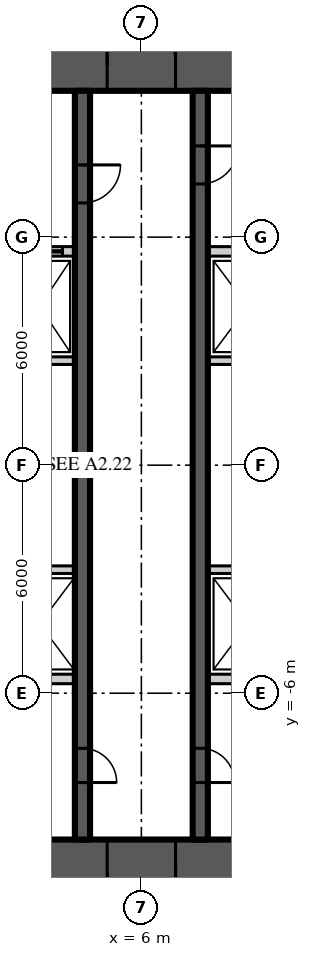
"""IFC4 building model, lengths in metres.
Left out: names, types, materials, properties, quantities, classifications, styles, units other than length and angle.
Written with IfcOpenShell. Run it as: python <this file> out.ifc"""

import sys

from ifc_helpers import new_model, si_unit, direction, frame, frame_2d, origin, place, context, subcontext, project, spatial, rectangle, extrude, element, fill, save


model = new_model("IFC4")
c1 = context("Model", 3, precision=1e-05, world=origin(), true_north=direction((0.0, 1.0)))
c2 = subcontext(c1, "Body", "Model", "MODEL_VIEW")
j1 = project(units=[si_unit("LENGTHUNIT", "METRE"), si_unit("PLANEANGLEUNIT", "RADIAN")], contexts=[c1])
p1 = place(None, origin())
s1 = spatial("IfcSite", under=j1, at=p1, CompositionType="ELEMENT")
p2 = place(p1, origin())
s2 = spatial("IfcBuilding", under=s1, at=p2, CompositionType="ELEMENT")
p3 = place(p2, frame((0.0, 0.0, 167.1)))
s3 = spatial("IfcBuildingStorey", under=s2, at=p3, CompositionType="ELEMENT", Elevation=167.1)
p4 = place(p3, frame((-11.15, 10.5, 0.0), z_axis=(0.0, 0.0, 1.0), x_axis=(1.0, 0.0, 0.0)))
e1 = element("IfcWall", 1, at=p4, inside=s3, PredefinedType="SHEAR", context=c2, shape_type="SweptSolid", body=[
    extrude(rectangle(XDim=22.3, YDim=1.3, at=frame_2d((11.15, 0.0))), origin(), (0.0, 0.0, 1.0), 3.9),
])
p5 = place(p4, frame((4.25, 0.0, 0.0)))
e2 = element("IfcOpeningElement", 2, at=p5, cuts=e1, PredefinedType="OPENING", context=c2, shape_type="SweptSolid", body=[
    extrude(rectangle(XDim=1.8, YDim=2.2, at=frame_2d((0.9, 1.1))), frame((0.0, 0.66, 0.0), z_axis=(0.0, -1.0, 0.0), x_axis=(1.0, 0.0, 0.0)), (0.0, 0.0, 1.0), 1.32),
])
p6 = place(p4, frame((16.25, 0.0, 0.0)))
e3 = element("IfcOpeningElement", 3, at=p6, cuts=e1, PredefinedType="OPENING", context=c2, shape_type="SweptSolid", body=[
    extrude(rectangle(XDim=1.8, YDim=2.2, at=frame_2d((0.9, 1.1))), frame((0.0, 0.66, 0.0), z_axis=(0.0, -1.0, 0.0), x_axis=(1.0, 0.0, 0.0)), (0.0, 0.0, 1.0), 1.32),
])
p7 = place(p3, frame((11.15, -10.5, 0.0), z_axis=(0.0, 0.0, 1.0), x_axis=(-1.0, 0.0, 0.0)))
e4 = element("IfcWall", 4, at=p7, inside=s3, PredefinedType="SHEAR", context=c2, shape_type="SweptSolid", body=[
    extrude(rectangle(XDim=22.3, YDim=1.3, at=frame_2d((11.15, 0.0))), origin(), (0.0, 0.0, 1.0), 3.9),
])
p8 = place(p7, frame((16.25, 0.0, 0.0)))
e5 = element("IfcOpeningElement", 5, at=p8, cuts=e4, PredefinedType="OPENING", context=c2, shape_type="SweptSolid", body=[
    extrude(rectangle(XDim=1.8, YDim=2.2, at=frame_2d((0.9, 1.1))), frame((0.0, 0.66, 0.0), z_axis=(0.0, -1.0, 0.0), x_axis=(1.0, 0.0, 0.0)), (0.0, 0.0, 1.0), 1.32),
])
p9 = place(p7, frame((4.25, 0.0, 0.0)))
e6 = element("IfcOpeningElement", 6, at=p9, cuts=e4, PredefinedType="OPENING", context=c2, shape_type="SweptSolid", body=[
    extrude(rectangle(XDim=1.8, YDim=2.2, at=frame_2d((0.9, 1.1))), frame((0.0, 0.66, 0.0), z_axis=(0.0, -1.0, 0.0), x_axis=(1.0, 0.0, 0.0)), (0.0, 0.0, 1.0), 1.32),
])
p10 = place(p3, frame((7.55, 9.85, 0.0), z_axis=(0.0, 0.0, 1.0), x_axis=(0.0, -1.0, 0.0)))
e7 = element("IfcWall", 7, at=p10, inside=s3, PredefinedType="SHEAR", context=c2, shape_type="SweptSolid", body=[
    extrude(rectangle(XDim=19.7, YDim=0.4, at=frame_2d((9.85, 0.0))), origin(), (0.0, 0.0, 1.0), 3.9),
])
p11 = place(p10, frame((1.45, 0.0, 0.0)))
e8 = element("IfcOpeningElement", 8, at=p11, cuts=e7, PredefinedType="OPENING", context=c2, shape_type="SweptSolid", body=[
    extrude(rectangle(XDim=1.0, YDim=2.2, at=frame_2d((0.5, 1.1))), frame((0.0, 0.21, 0.0), z_axis=(0.0, -1.0, 0.0), x_axis=(1.0, 0.0, 0.0)), (0.0, 0.0, 1.0), 0.42),
])
p12 = place(p10, frame((17.3, 0.0, 0.0)))
e9 = element("IfcOpeningElement", 9, at=p12, cuts=e7, PredefinedType="OPENING", context=c2, shape_type="SweptSolid", body=[
    extrude(rectangle(XDim=0.9, YDim=2.1, at=frame_2d((0.45, 1.05))), frame((0.0, 0.21, 0.0), z_axis=(0.0, -1.0, 0.0), x_axis=(1.0, 0.0, 0.0)), (0.0, 0.0, 1.0), 0.42),
])
p13 = place(p3, frame((4.45, 9.85, 0.0), z_axis=(0.0, 0.0, 1.0), x_axis=(0.0, -1.0, 0.0)))
e10 = element("IfcWall", 10, at=p13, inside=s3, PredefinedType="SHEAR", context=c2, shape_type="SweptSolid", body=[
    extrude(rectangle(XDim=19.7, YDim=0.4, at=frame_2d((9.85, 0.0))), origin(), (0.0, 0.0, 1.0), 3.9),
])
p14 = place(p13, frame((1.95, 0.0, 0.0)))
e11 = element("IfcOpeningElement", 11, at=p14, cuts=e10, PredefinedType="OPENING", context=c2, shape_type="SweptSolid", body=[
    extrude(rectangle(XDim=1.0, YDim=2.2, at=frame_2d((0.5, 1.1))), frame((0.0, 0.21, 0.0), z_axis=(0.0, -1.0, 0.0), x_axis=(1.0, 0.0, 0.0)), (0.0, 0.0, 1.0), 0.42),
])
p15 = place(p13, frame((17.3, 0.0, 0.0)))
e12 = element("IfcOpeningElement", 12, at=p15, cuts=e10, PredefinedType="OPENING", context=c2, shape_type="SweptSolid", body=[
    extrude(rectangle(XDim=0.9, YDim=2.1, at=frame_2d((0.45, 1.05))), frame((0.0, 0.21, 0.0), z_axis=(0.0, -1.0, 0.0), x_axis=(1.0, 0.0, 0.0)), (0.0, 0.0, 1.0), 0.42),
])
p16 = place(p3, frame((2.4, 5.625, 0.0), z_axis=(0.0, 0.0, 1.0), x_axis=(1.0, 0.0, 0.0)))
e13 = element("IfcWall", 13, at=p16, inside=s3, PredefinedType="SOLIDWALL", context=c2, shape_type="SweptSolid", body=[
    extrude(rectangle(XDim=1.85, YDim=0.25, at=frame_2d((0.925, 0.0))), origin(), (0.0, 0.0, 1.0), 3.7),
])
p17 = place(p16, frame((0.325, 0.0, 0.0)))
e14 = element("IfcOpeningElement", 14, at=p17, cuts=e13, PredefinedType="OPENING", context=c2, shape_type="SweptSolid", body=[
    extrude(rectangle(XDim=1.2, YDim=2.2, at=frame_2d((0.6, 1.1))), frame((0.0, 0.135, 0.0), z_axis=(0.0, -1.0, 0.0), x_axis=(1.0, 0.0, 0.0)), (0.0, 0.0, 1.0), 0.27),
])
p18 = place(p3, frame((7.75, 5.625, 0.0), z_axis=(0.0, 0.0, 1.0), x_axis=(1.0, 0.0, 0.0)))
e15 = element("IfcWall", 15, at=p18, inside=s3, PredefinedType="SOLIDWALL", context=c2, shape_type="SweptSolid", body=[
    extrude(rectangle(XDim=2.1, YDim=0.25, at=frame_2d((1.05, 0.0))), origin(), (0.0, 0.0, 1.0), 3.7),
])
p19 = place(p3, frame((2.4, -5.625, 0.0), z_axis=(0.0, 0.0, 1.0), x_axis=(1.0, 0.0, 0.0)))
e16 = element("IfcWall", 16, at=p19, inside=s3, PredefinedType="SOLIDWALL", context=c2, shape_type="SweptSolid", body=[
    extrude(rectangle(XDim=1.85, YDim=0.25, at=frame_2d((0.925, 0.0))), origin(), (0.0, 0.0, 1.0), 3.7),
])
p20 = place(p3, frame((7.75, -5.625, 0.0), z_axis=(0.0, 0.0, 1.0), x_axis=(1.0, 0.0, 0.0)))
e17 = element("IfcWall", 17, at=p20, inside=s3, PredefinedType="SOLIDWALL", context=c2, shape_type="SweptSolid", body=[
    extrude(rectangle(XDim=2.1, YDim=0.25, at=frame_2d((1.05, 0.0))), origin(), (0.0, 0.0, 1.0), 3.7),
])
p21 = place(p3, frame((2.4, -2.75, 0.0), z_axis=(0.0, 0.0, 1.0), x_axis=(1.0, 0.0, 0.0)))
e18 = element("IfcWall", 18, at=p21, inside=s3, PredefinedType="SOLIDWALL", context=c2, shape_type="SweptSolid", body=[
    extrude(rectangle(XDim=1.85, YDim=0.2, at=frame_2d((0.925, 0.0))), origin(), (0.0, 0.0, 1.0), 3.7),
])
p22 = place(p3, frame((7.75, -2.75, 0.0), z_axis=(0.0, 0.0, 1.0), x_axis=(1.0, 0.0, 0.0)))
e19 = element("IfcWall", 19, at=p22, inside=s3, PredefinedType="SOLIDWALL", context=c2, shape_type="SweptSolid", body=[
    extrude(rectangle(XDim=2.1, YDim=0.2, at=frame_2d((1.05, 0.0))), origin(), (0.0, 0.0, 1.0), 3.7),
])
p23 = place(p3, frame((2.4, 2.75, 0.0), z_axis=(0.0, 0.0, 1.0), x_axis=(1.0, 0.0, 0.0)))
e20 = element("IfcWall", 20, at=p23, inside=s3, PredefinedType="SOLIDWALL", context=c2, shape_type="SweptSolid", body=[
    extrude(rectangle(XDim=1.85, YDim=0.2, at=frame_2d((0.925, 0.0))), origin(), (0.0, 0.0, 1.0), 3.7),
])
p24 = place(p3, frame((7.75, 2.75, 0.0), z_axis=(0.0, 0.0, 1.0), x_axis=(1.0, 0.0, 0.0)))
e21 = element("IfcWall", 21, at=p24, inside=s3, PredefinedType="SOLIDWALL", context=c2, shape_type="SweptSolid", body=[
    extrude(rectangle(XDim=2.1, YDim=0.2, at=frame_2d((1.05, 0.0))), origin(), (0.0, 0.0, 1.0), 3.7),
])
p25 = place(p6, origin())
e22 = element("IfcDoor", 22, at=p25, inside=s3, OperationType="DOUBLE_DOOR_DOUBLE_SWING", PredefinedType="DOOR", context=c2, shape_type="SweptSolid", body=[
    extrude(rectangle(XDim=1.8, YDim=2.2, at=frame_2d((0.9, 1.1))), frame((0.0, 0.025, 0.0), z_axis=(0.0, -1.0, 0.0), x_axis=(1.0, 0.0, 0.0)), (0.0, 0.0, 1.0), 0.05),
])
fill(e3, e22)
p26 = place(p9, origin())
e23 = element("IfcDoor", 23, at=p26, inside=s3, OperationType="DOUBLE_DOOR_DOUBLE_SWING", PredefinedType="DOOR", context=c2, shape_type="SweptSolid", body=[
    extrude(rectangle(XDim=1.8, YDim=2.2, at=frame_2d((0.9, 1.1))), frame((0.0, 0.025, 0.0), z_axis=(0.0, -1.0, 0.0), x_axis=(1.0, 0.0, 0.0)), (0.0, 0.0, 1.0), 0.05),
])
fill(e6, e23)
p27 = place(p11, origin())
e24 = element("IfcDoor", 24, at=p27, inside=s3, OperationType="SINGLE_SWING_LEFT", PredefinedType="DOOR", context=c2, shape_type="SweptSolid", body=[
    extrude(rectangle(XDim=1.0, YDim=2.2, at=frame_2d((0.5, 1.1))), frame((0.0, 0.025, 0.0), z_axis=(0.0, -1.0, 0.0), x_axis=(1.0, 0.0, 0.0)), (0.0, 0.0, 1.0), 0.05),
])
fill(e8, e24)
p28 = place(p14, origin())
e25 = element("IfcDoor", 25, at=p28, inside=s3, OperationType="SINGLE_SWING_LEFT", PredefinedType="DOOR", context=c2, shape_type="SweptSolid", body=[
    extrude(rectangle(XDim=1.0, YDim=2.2, at=frame_2d((0.5, 1.1))), frame((0.0, 0.025, 0.0), z_axis=(0.0, -1.0, 0.0), x_axis=(1.0, 0.0, 0.0)), (0.0, 0.0, 1.0), 0.05),
])
fill(e11, e25)
p29 = place(p12, origin())
e26 = element("IfcDoor", 26, at=p29, inside=s3, OperationType="SINGLE_SWING_RIGHT", PredefinedType="DOOR", context=c2, shape_type="SweptSolid", body=[
    extrude(rectangle(XDim=0.9, YDim=2.1, at=frame_2d((0.45, 1.05))), frame((0.0, 0.025, 0.0), z_axis=(0.0, -1.0, 0.0), x_axis=(1.0, 0.0, 0.0)), (0.0, 0.0, 1.0), 0.05),
])
fill(e9, e26)
p30 = place(p15, origin())
e27 = element("IfcDoor", 27, at=p30, inside=s3, OperationType="SINGLE_SWING_RIGHT", PredefinedType="DOOR", context=c2, shape_type="SweptSolid", body=[
    extrude(rectangle(XDim=0.9, YDim=2.1, at=frame_2d((0.45, 1.05))), frame((0.0, 0.025, 0.0), z_axis=(0.0, -1.0, 0.0), x_axis=(1.0, 0.0, 0.0)), (0.0, 0.0, 1.0), 0.05),
])
fill(e12, e27)
p31 = place(p17, origin())
e28 = element("IfcDoor", 28, at=p31, inside=s3, OperationType="SLIDING_TO_LEFT", PredefinedType="DOOR", context=c2, shape_type="SweptSolid", body=[
    extrude(rectangle(XDim=1.2, YDim=2.2, at=frame_2d((0.6, 1.1))), frame((0.0, 0.025, 0.0), z_axis=(0.0, -1.0, 0.0), x_axis=(1.0, 0.0, 0.0)), (0.0, 0.0, 1.0), 0.05),
])
fill(e14, e28)
save(model, sys.argv[1])
